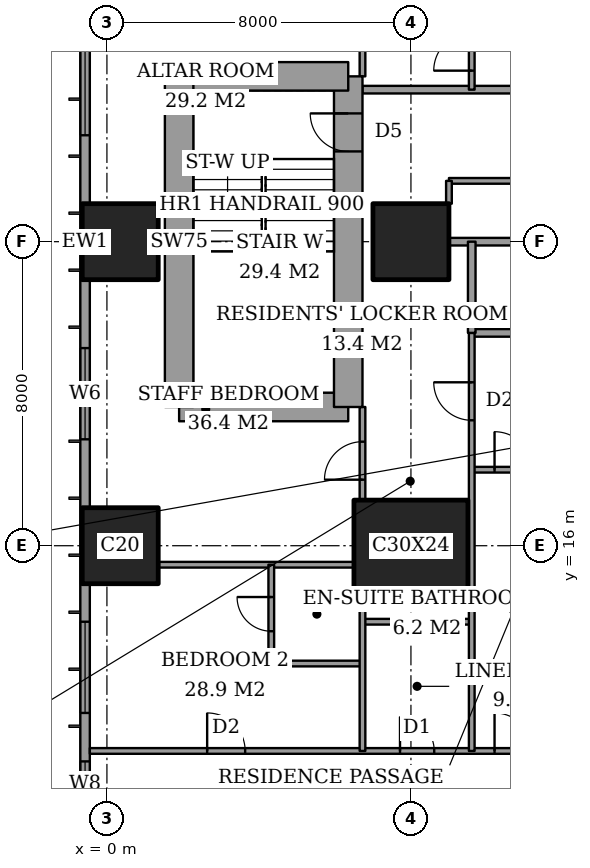
"""IFC4 building model, lengths in metres.
Left out: names, types, materials, properties, quantities, classifications, styles, units other than length and angle.
Written with IfcOpenShell. Run it as: python <this file> out.ifc"""

import sys

from ifc_helpers import new_model, si_unit, direction, frame, frame_2d, origin, origin_2d, place, context, subcontext, project, spatial, rectangle, extrude, element, fill, save


model = new_model("IFC4")
c1 = context("Model", 3, precision=1e-05, world=origin(), true_north=direction((0.0, 1.0)))
c2 = subcontext(c1, "Body", "Model", "MODEL_VIEW")
j1 = project(units=[si_unit("LENGTHUNIT", "METRE"), si_unit("PLANEANGLEUNIT", "RADIAN")], contexts=[c1])
p1 = place(None, origin())
s1 = spatial("IfcSite", under=j1, at=p1, CompositionType="ELEMENT")
p2 = place(p1, origin())
s2 = spatial("IfcBuilding", under=s1, at=p2, CompositionType="ELEMENT")
p3 = place(p2, frame((0.0, 0.0, 58.4)))
s3 = spatial("IfcBuildingStorey", under=s2, at=p3, CompositionType="ELEMENT", Elevation=58.4)
for number, where, z_axis, x_axis in (
    (1, (0.35, 16.0, 0.0), (0.0, 0.0, 1.0), (1.0, 0.0, 0.0)),
    (2, (0.35, 24.0, 0.0), (0.0, 0.0, 1.0), (1.0, 0.0, 0.0)),
):
    element("IfcColumn", number, at=place(p3, frame(where, z_axis=z_axis, x_axis=x_axis)), inside=s3, PredefinedType="COLUMN", context=c2, shape_type="SweptSolid", body=[
        extrude(rectangle(XDim=2.0, YDim=2.0, at=origin_2d()), origin(), (0.0, 0.0, 1.0), 3.6),
    ])
p4 = place(p3, frame((8.0, 16.0, 0.0), z_axis=(0.0, 0.0, 1.0), x_axis=(1.0, 0.0, 0.0)))
e3 = element("IfcColumn", 3, at=p4, inside=s3, PredefinedType="COLUMN", context=c2, shape_type="SweptSolid", body=[
    extrude(rectangle(XDim=3.0, YDim=2.4, at=origin_2d()), origin(), (0.0, 0.0, 1.0), 3.6),
])
p5 = place(p3, frame((8.0, 24.0, 0.0), z_axis=(0.0, 0.0, 1.0), x_axis=(1.0, 0.0, 0.0)))
e4 = element("IfcColumn", 4, at=p5, inside=s3, PredefinedType="COLUMN", context=c2, shape_type="SweptSolid", body=[
    extrude(rectangle(XDim=2.0, YDim=2.0, at=origin_2d()), origin(), (0.0, 0.0, 1.0), 3.6),
])
p6 = place(p3, frame((1.9, 19.65, 0.0), z_axis=(0.0, 0.0, 1.0), x_axis=(1.0, 0.0, 0.0)))
e5 = element("IfcWall", 5, at=p6, inside=s3, PredefinedType="SHEAR", context=c2, shape_type="SweptSolid", body=[
    extrude(rectangle(XDim=4.45, YDim=0.75, at=frame_2d((2.225, 0.0))), origin(), (0.0, 0.0, 1.0), 3.6),
])
p7 = place(p3, frame((6.35, 19.65, 0.0), z_axis=(0.0, 0.0, 1.0), x_axis=(0.0, 1.0, 0.0)))
e6 = element("IfcWall", 6, at=p7, inside=s3, PredefinedType="SHEAR", context=c2, shape_type="SweptSolid", body=[
    extrude(rectangle(XDim=8.7, YDim=0.75, at=frame_2d((4.35, 0.0))), origin(), (0.0, 0.0, 1.0), 3.6),
])
p8 = place(p7, frame((6.725, 0.0, 0.0)))
e7 = element("IfcOpeningElement", 7, at=p8, cuts=e6, PredefinedType="OPENING", context=c2, shape_type="SweptSolid", body=[
    extrude(rectangle(XDim=1.0, YDim=2.1, at=frame_2d((0.5, 1.05))), frame((0.0, 0.385, 0.0), z_axis=(0.0, -1.0, 0.0), x_axis=(1.0, 0.0, 0.0)), (0.0, 0.0, 1.0), 0.77),
])
p9 = place(p3, frame((6.35, 28.35, 0.0), z_axis=(0.0, 0.0, 1.0), x_axis=(-1.0, 0.0, 0.0)))
e8 = element("IfcWall", 8, at=p9, inside=s3, PredefinedType="SHEAR", context=c2, shape_type="SweptSolid", body=[
    extrude(rectangle(XDim=4.45, YDim=0.75, at=frame_2d((2.225, 0.0))), origin(), (0.0, 0.0, 1.0), 3.6),
])
p10 = place(p3, frame((1.9, 28.35, 0.0), z_axis=(0.0, 0.0, 1.0), x_axis=(0.0, -1.0, 0.0)))
e9 = element("IfcWall", 9, at=p10, inside=s3, PredefinedType="SHEAR", context=c2, shape_type="SweptSolid", body=[
    extrude(rectangle(XDim=8.7, YDim=0.75, at=frame_2d((4.35, 0.0))), origin(), (0.0, 0.0, 1.0), 3.6),
])
p11 = place(p3, frame((-0.575, 44.825, 0.0), z_axis=(0.0, 0.0, 1.0), x_axis=(0.0, -1.0, 0.0)))
e10 = element("IfcWall", 10, at=p11, inside=s3, PredefinedType="SOLIDWALL", context=c2, shape_type="SweptSolid", body=[
    extrude(rectangle(XDim=41.65, YDim=0.25, at=frame_2d((20.825, 0.0))), origin(), (0.0, 0.0, 1.0), 3.6),
])
p12 = place(p11, frame((0.775, 0.0, 0.6)))
e11 = element("IfcOpeningElement", 11, at=p12, cuts=e10, PredefinedType="OPENING", context=c2, shape_type="SweptSolid", body=[
    extrude(rectangle(XDim=2.4, YDim=2.0, at=frame_2d((1.2, 1.0))), frame((0.0, 0.135, 0.0), z_axis=(0.0, -1.0, 0.0), x_axis=(1.0, 0.0, 0.0)), (0.0, 0.0, 1.0), 0.27),
])
p13 = place(p11, frame((6.1, 0.0, 0.6)))
e12 = element("IfcOpeningElement", 12, at=p13, cuts=e10, PredefinedType="OPENING", context=c2, shape_type="SweptSolid", body=[
    extrude(rectangle(XDim=1.2, YDim=2.0, at=frame_2d((0.6, 1.0))), frame((0.0, 0.135, 0.0), z_axis=(0.0, -1.0, 0.0), x_axis=(1.0, 0.0, 0.0)), (0.0, 0.0, 1.0), 0.27),
])
p14 = place(p11, frame((8.425, 0.0, 0.6)))
e13 = element("IfcOpeningElement", 13, at=p14, cuts=e10, PredefinedType="OPENING", context=c2, shape_type="SweptSolid", body=[
    extrude(rectangle(XDim=2.4, YDim=2.0, at=frame_2d((1.2, 1.0))), frame((0.0, 0.135, 0.0), z_axis=(0.0, -1.0, 0.0), x_axis=(1.0, 0.0, 0.0)), (0.0, 0.0, 1.0), 0.27),
])
p15 = place(p11, frame((15.625, 0.0, 0.6)))
e14 = element("IfcOpeningElement", 14, at=p15, cuts=e10, PredefinedType="OPENING", context=c2, shape_type="SweptSolid", body=[
    extrude(rectangle(XDim=2.4, YDim=2.0, at=frame_2d((1.2, 1.0))), frame((0.0, 0.135, 0.0), z_axis=(0.0, -1.0, 0.0), x_axis=(1.0, 0.0, 0.0)), (0.0, 0.0, 1.0), 0.27),
])
p16 = place(p11, frame((23.625, 0.0, 0.6)))
e15 = element("IfcOpeningElement", 15, at=p16, cuts=e10, PredefinedType="OPENING", context=c2, shape_type="SweptSolid", body=[
    extrude(rectangle(XDim=2.4, YDim=2.0, at=frame_2d((1.2, 1.0))), frame((0.0, 0.135, 0.0), z_axis=(0.0, -1.0, 0.0), x_axis=(1.0, 0.0, 0.0)), (0.0, 0.0, 1.0), 0.27),
])
p17 = place(p11, frame((30.825, 0.0, 0.6)))
e16 = element("IfcOpeningElement", 16, at=p17, cuts=e10, PredefinedType="OPENING", context=c2, shape_type="SweptSolid", body=[
    extrude(rectangle(XDim=2.4, YDim=2.0, at=frame_2d((1.2, 1.0))), frame((0.0, 0.135, 0.0), z_axis=(0.0, -1.0, 0.0), x_axis=(1.0, 0.0, 0.0)), (0.0, 0.0, 1.0), 0.27),
])
p18 = place(p11, frame((34.5, 0.0, 0.6)))
e17 = element("IfcOpeningElement", 17, at=p18, cuts=e10, PredefinedType="OPENING", context=c2, shape_type="SweptSolid", body=[
    extrude(rectangle(XDim=1.2, YDim=2.0, at=frame_2d((0.6, 1.0))), frame((0.0, 0.135, 0.0), z_axis=(0.0, -1.0, 0.0), x_axis=(1.0, 0.0, 0.0)), (0.0, 0.0, 1.0), 0.27),
])
p19 = place(p11, frame((38.475, 0.0, 0.6)))
e18 = element("IfcOpeningElement", 18, at=p19, cuts=e10, PredefinedType="OPENING", context=c2, shape_type="SweptSolid", body=[
    extrude(rectangle(XDim=2.4, YDim=2.0, at=frame_2d((1.2, 1.0))), frame((0.0, 0.135, 0.0), z_axis=(0.0, -1.0, 0.0), x_axis=(1.0, 0.0, 0.0)), (0.0, 0.0, 1.0), 0.27),
])
p20 = place(p3, frame((-0.45, 10.6, 0.0), z_axis=(0.0, 0.0, 1.0), x_axis=(1.0, 0.0, 0.0)))
e19 = element("IfcWall", 19, at=p20, inside=s3, PredefinedType="PARTITIONING", context=c2, shape_type="SweptSolid", body=[
    extrude(rectangle(XDim=25.011, YDim=0.15, at=frame_2d((12.505, 0.0))), origin(), (0.0, 0.0, 1.0), 3.35),
])
p21 = place(p20, frame((10.65, 0.0, 0.0)))
e20 = element("IfcOpeningElement", 20, at=p21, cuts=e19, PredefinedType="OPENING", context=c2, shape_type="SweptSolid", body=[
    extrude(rectangle(XDim=1.0, YDim=2.1, at=frame_2d((0.5, 1.05))), frame((0.0, 0.085, 0.0), z_axis=(0.0, -1.0, 0.0), x_axis=(1.0, 0.0, 0.0)), (0.0, 0.0, 1.0), 0.17),
])
p22 = place(p20, frame((3.087, 0.0, 0.0)))
e21 = element("IfcOpeningElement", 21, at=p22, cuts=e19, PredefinedType="OPENING", context=c2, shape_type="SweptSolid", body=[
    extrude(rectangle(XDim=1.0, YDim=2.1, at=frame_2d((0.5, 1.05))), frame((0.0, 0.085, 0.0), z_axis=(0.0, -1.0, 0.0), x_axis=(1.0, 0.0, 0.0)), (0.0, 0.0, 1.0), 0.17),
])
p23 = place(p20, frame((8.163, 0.0, 0.0)))
e22 = element("IfcOpeningElement", 22, at=p23, cuts=e19, PredefinedType="OPENING", context=c2, shape_type="SweptSolid", body=[
    extrude(rectangle(XDim=0.9, YDim=2.1, at=frame_2d((0.45, 1.05))), frame((0.0, 0.085, 0.0), z_axis=(0.0, -1.0, 0.0), x_axis=(1.0, 0.0, 0.0)), (0.0, 0.0, 1.0), 0.17),
])
p24 = place(p20, frame((13.35, 0.0, 0.0)))
e23 = element("IfcOpeningElement", 23, at=p24, cuts=e19, PredefinedType="OPENING", context=c2, shape_type="SweptSolid", body=[
    extrude(rectangle(XDim=1.0, YDim=2.1, at=frame_2d((0.5, 1.05))), frame((0.0, 0.085, 0.0), z_axis=(0.0, -1.0, 0.0), x_axis=(1.0, 0.0, 0.0)), (0.0, 0.0, 1.0), 0.17),
])
p25 = place(p20, frame((16.45, 0.0, 0.0)))
e24 = element("IfcOpeningElement", 24, at=p25, cuts=e19, PredefinedType="OPENING", context=c2, shape_type="SweptSolid", body=[
    extrude(rectangle(XDim=1.0, YDim=2.1, at=frame_2d((0.5, 1.05))), frame((0.0, 0.085, 0.0), z_axis=(0.0, -1.0, 0.0), x_axis=(1.0, 0.0, 0.0)), (0.0, 0.0, 1.0), 0.17),
])
p26 = place(p20, frame((21.175, 0.0, 0.0)))
e25 = element("IfcOpeningElement", 25, at=p26, cuts=e19, PredefinedType="OPENING", context=c2, shape_type="SweptSolid", body=[
    extrude(rectangle(XDim=1.0, YDim=2.1, at=frame_2d((0.5, 1.05))), frame((0.0, 0.085, 0.0), z_axis=(0.0, -1.0, 0.0), x_axis=(1.0, 0.0, 0.0)), (0.0, 0.0, 1.0), 0.17),
])
p27 = place(p3, frame((4.325, 12.9, 0.0), z_axis=(0.0, 0.0, 1.0), x_axis=(1.0, 0.0, 0.0)))
e26 = element("IfcWall", 26, at=p27, inside=s3, PredefinedType="PARTITIONING", context=c2, shape_type="SweptSolid", body=[
    extrude(rectangle(XDim=2.4, YDim=0.15, at=frame_2d((1.2, 0.0))), origin(), (0.0, 0.0, 1.0), 3.35),
])
p28 = place(p3, frame((6.725, 14.0, 0.0), z_axis=(0.0, 0.0, 1.0), x_axis=(1.0, 0.0, 0.0)))
e27 = element("IfcWall", 27, at=p28, inside=s3, PredefinedType="PARTITIONING", context=c2, shape_type="SweptSolid", body=[
    extrude(rectangle(XDim=2.875, YDim=0.15, at=frame_2d((1.438, 0.0))), origin(), (0.0, 0.0, 1.0), 3.35),
])
p29 = place(p3, frame((1.35, 15.5, 0.0), z_axis=(0.0, 0.0, 1.0), x_axis=(1.0, 0.0, 0.0)))
e28 = element("IfcWall", 28, at=p29, inside=s3, PredefinedType="PARTITIONING", context=c2, shape_type="SweptSolid", body=[
    extrude(rectangle(XDim=5.15, YDim=0.15, at=frame_2d((2.575, 0.0))), origin(), (0.0, 0.0, 1.0), 3.35),
])
p30 = place(p3, frame((9.6, 18.0, 0.0), z_axis=(0.0, 0.0, 1.0), x_axis=(1.0, 0.0, 0.0)))
e29 = element("IfcWall", 29, at=p30, inside=s3, PredefinedType="PARTITIONING", context=c2, shape_type="SweptSolid", body=[
    extrude(rectangle(XDim=4.8, YDim=0.15, at=frame_2d((2.4, 0.0))), origin(), (0.0, 0.0, 1.0), 3.35),
])
p31 = place(p30, frame((0.6, 0.0, 0.0)))
e30 = element("IfcOpeningElement", 30, at=p31, cuts=e29, PredefinedType="OPENING", context=c2, shape_type="SweptSolid", body=[
    extrude(rectangle(XDim=1.0, YDim=2.1, at=frame_2d((0.5, 1.05))), frame((0.0, 0.085, 0.0), z_axis=(0.0, -1.0, 0.0), x_axis=(1.0, 0.0, 0.0)), (0.0, 0.0, 1.0), 0.17),
])
p32 = place(p3, frame((9.6, 21.6, 0.0), z_axis=(0.0, 0.0, 1.0), x_axis=(1.0, 0.0, 0.0)))
e31 = element("IfcWall", 31, at=p32, inside=s3, PredefinedType="PARTITIONING", context=c2, shape_type="SweptSolid", body=[
    extrude(rectangle(XDim=5.2, YDim=0.2, at=frame_2d((2.6, 0.0))), origin(), (0.0, 0.0, 1.0), 3.35),
])
p33 = place(p32, frame((2.15, 0.0, 0.0)))
e32 = element("IfcOpeningElement", 32, at=p33, cuts=e31, PredefinedType="OPENING", context=c2, shape_type="SweptSolid", body=[
    extrude(rectangle(XDim=0.9, YDim=2.1, at=frame_2d((0.45, 1.05))), frame((0.0, 0.11, 0.0), z_axis=(0.0, -1.0, 0.0), x_axis=(1.0, 0.0, 0.0)), (0.0, 0.0, 1.0), 0.22),
])
p34 = place(p3, frame((9.0, 24.0, 0.0), z_axis=(0.0, 0.0, 1.0), x_axis=(1.0, 0.0, 0.0)))
e33 = element("IfcWall", 33, at=p34, inside=s3, PredefinedType="PARTITIONING", context=c2, shape_type="SweptSolid", body=[
    extrude(rectangle(XDim=6.0, YDim=0.2, at=frame_2d((3.0, 0.0))), origin(), (0.0, 0.0, 1.0), 3.35),
])
p35 = place(p3, frame((9.0, 25.6, 0.0), z_axis=(0.0, 0.0, 1.0), x_axis=(1.0, 0.0, 0.0)))
e34 = element("IfcWall", 34, at=p35, inside=s3, PredefinedType="PARTITIONING", context=c2, shape_type="SweptSolid", body=[
    extrude(rectangle(XDim=8.4, YDim=0.15, at=frame_2d((4.2, 0.0))), origin(), (0.0, 0.0, 1.0), 3.35),
])
p36 = place(p35, frame((3.75, 0.0, 0.0)))
e35 = element("IfcOpeningElement", 35, at=p36, cuts=e34, PredefinedType="OPENING", context=c2, shape_type="SweptSolid", body=[
    extrude(rectangle(XDim=0.9, YDim=2.1, at=frame_2d((0.45, 1.05))), frame((0.0, 0.085, 0.0), z_axis=(0.0, -1.0, 0.0), x_axis=(1.0, 0.0, 0.0)), (0.0, 0.0, 1.0), 0.17),
])
p37 = place(p3, frame((6.725, 28.0, 0.0), z_axis=(0.0, 0.0, 1.0), x_axis=(1.0, 0.0, 0.0)))
e36 = element("IfcWall", 36, at=p37, inside=s3, PredefinedType="PARTITIONING", context=c2, shape_type="SweptSolid", body=[
    extrude(rectangle(XDim=17.275, YDim=0.2, at=frame_2d((8.637, 0.0))), origin(), (0.0, 0.0, 1.0), 3.35),
])
p38 = place(p37, frame((6.475, 0.0, 0.0)))
e37 = element("IfcOpeningElement", 37, at=p38, cuts=e36, PredefinedType="OPENING", context=c2, shape_type="SweptSolid", body=[
    extrude(rectangle(XDim=1.2, YDim=2.4, at=frame_2d((0.6, 1.2))), frame((0.0, 0.11, 0.0), z_axis=(0.0, -1.0, 0.0), x_axis=(1.0, 0.0, 0.0)), (0.0, 0.0, 1.0), 0.22),
])
p39 = place(p3, frame((4.325, 12.9, 0.0), z_axis=(0.0, 0.0, 1.0), x_axis=(0.0, 1.0, 0.0)))
e38 = element("IfcWall", 38, at=p39, inside=s3, PredefinedType="PARTITIONING", context=c2, shape_type="SweptSolid", body=[
    extrude(rectangle(XDim=2.6, YDim=0.15, at=frame_2d((1.3, 0.0))), origin(), (0.0, 0.0, 1.0), 3.35),
])
p40 = place(p39, frame((0.85, 0.0, 0.0)))
e39 = element("IfcOpeningElement", 39, at=p40, cuts=e38, PredefinedType="OPENING", context=c2, shape_type="SweptSolid", body=[
    extrude(rectangle(XDim=0.9, YDim=2.1, at=frame_2d((0.45, 1.05))), frame((0.0, 0.085, 0.0), z_axis=(0.0, -1.0, 0.0), x_axis=(1.0, 0.0, 0.0)), (0.0, 0.0, 1.0), 0.17),
])
p41 = place(p3, frame((6.725, 10.6, 0.0), z_axis=(0.0, 0.0, 1.0), x_axis=(0.0, 1.0, 0.0)))
e40 = element("IfcWall", 40, at=p41, inside=s3, PredefinedType="PARTITIONING", context=c2, shape_type="SweptSolid", body=[
    extrude(rectangle(XDim=4.2, YDim=0.15, at=frame_2d((2.1, 0.0))), origin(), (0.0, 0.0, 1.0), 3.35),
])
p42 = place(p3, frame((6.725, 17.2, 0.0), z_axis=(0.0, 0.0, 1.0), x_axis=(0.0, 1.0, 0.0)))
e41 = element("IfcWall", 41, at=p42, inside=s3, PredefinedType="PARTITIONING", context=c2, shape_type="SweptSolid", body=[
    extrude(rectangle(XDim=2.45, YDim=0.15, at=frame_2d((1.225, 0.0))), origin(), (0.0, 0.0, 1.0), 3.35),
])
p43 = place(p42, frame((0.538, 0.0, 0.0)))
e42 = element("IfcOpeningElement", 42, at=p43, cuts=e41, PredefinedType="OPENING", context=c2, shape_type="SweptSolid", body=[
    extrude(rectangle(XDim=1.0, YDim=2.1, at=frame_2d((0.5, 1.05))), frame((0.0, 0.085, 0.0), z_axis=(0.0, -1.0, 0.0), x_axis=(1.0, 0.0, 0.0)), (0.0, 0.0, 1.0), 0.17),
])
p44 = place(p3, frame((6.725, 28.35, 0.0), z_axis=(0.0, 0.0, 1.0), x_axis=(0.0, 1.0, 0.0)))
e43 = element("IfcWall", 43, at=p44, inside=s3, PredefinedType="PARTITIONING", context=c2, shape_type="SweptSolid", body=[
    extrude(rectangle(XDim=2.45, YDim=0.15, at=frame_2d((1.225, 0.0))), origin(), (0.0, 0.0, 1.0), 3.35),
])
p45 = place(p44, frame((0.913, 0.0, 0.0)))
e44 = element("IfcOpeningElement", 44, at=p45, cuts=e43, PredefinedType="OPENING", context=c2, shape_type="SweptSolid", body=[
    extrude(rectangle(XDim=1.0, YDim=2.1, at=frame_2d((0.5, 1.05))), frame((0.0, 0.085, 0.0), z_axis=(0.0, -1.0, 0.0), x_axis=(1.0, 0.0, 0.0)), (0.0, 0.0, 1.0), 0.17),
])
p46 = place(p3, frame((9.0, 25.0, 0.0), z_axis=(0.0, 0.0, 1.0), x_axis=(0.0, 1.0, 0.0)))
e45 = element("IfcWall", 45, at=p46, inside=s3, PredefinedType="PARTITIONING", context=c2, shape_type="SweptSolid", body=[
    extrude(rectangle(XDim=0.6, YDim=0.15, at=frame_2d((0.3, 0.0))), origin(), (0.0, 0.0, 1.0), 3.35),
])
p47 = place(p3, frame((9.6, 21.6, 0.0), z_axis=(0.0, 0.0, 1.0), x_axis=(0.0, 1.0, 0.0)))
e46 = element("IfcWall", 46, at=p47, inside=s3, PredefinedType="PARTITIONING", context=c2, shape_type="SweptSolid", body=[
    extrude(rectangle(XDim=2.4, YDim=0.2, at=frame_2d((1.2, 0.0))), origin(), (0.0, 0.0, 1.0), 3.35),
])
p48 = place(p3, frame((9.6, 10.6, 0.0), z_axis=(0.0, 0.0, 1.0), x_axis=(0.0, 1.0, 0.0)))
e47 = element("IfcWall", 47, at=p48, inside=s3, PredefinedType="PARTITIONING", context=c2, shape_type="SweptSolid", body=[
    extrude(rectangle(XDim=11.0, YDim=0.15, at=frame_2d((5.5, 0.0))), origin(), (0.0, 0.0, 1.0), 3.35),
])
p49 = place(p48, frame((8.7, 0.0, 0.0)))
e48 = element("IfcOpeningElement", 48, at=p49, cuts=e47, PredefinedType="OPENING", context=c2, shape_type="SweptSolid", body=[
    extrude(rectangle(XDim=1.0, YDim=2.1, at=frame_2d((0.5, 1.05))), frame((0.0, 0.085, 0.0), z_axis=(0.0, -1.0, 0.0), x_axis=(1.0, 0.0, 0.0)), (0.0, 0.0, 1.0), 0.17),
])
p50 = place(p3, frame((9.6, 28.0, 0.0), z_axis=(0.0, 0.0, 1.0), x_axis=(0.0, 1.0, 0.0)))
e49 = element("IfcWall", 49, at=p50, inside=s3, PredefinedType="PARTITIONING", context=c2, shape_type="SweptSolid", body=[
    extrude(rectangle(XDim=9.4, YDim=0.15, at=frame_2d((4.7, 0.0))), origin(), (0.0, 0.0, 1.0), 3.35),
])
p51 = place(p50, frame((0.5, 0.0, 0.0)))
e50 = element("IfcOpeningElement", 50, at=p51, cuts=e49, PredefinedType="OPENING", context=c2, shape_type="SweptSolid", body=[
    extrude(rectangle(XDim=1.0, YDim=2.1, at=frame_2d((0.5, 1.05))), frame((0.0, 0.085, 0.0), z_axis=(0.0, -1.0, 0.0), x_axis=(1.0, 0.0, 0.0)), (0.0, 0.0, 1.0), 0.17),
])
p52 = place(p15, origin())
e51 = element("IfcWindow", 51, at=p52, inside=s3, PartitioningType="SINGLE_PANEL", PredefinedType="WINDOW", context=c2, shape_type="SweptSolid", body=[
    extrude(rectangle(XDim=2.4, YDim=2.0, at=frame_2d((1.2, 1.0))), frame((0.0, 0.03, 0.0), z_axis=(0.0, -1.0, 0.0), x_axis=(1.0, 0.0, 0.0)), (0.0, 0.0, 1.0), 0.06),
])
fill(e14, e51)
p53 = place(p16, origin())
e52 = element("IfcWindow", 52, at=p53, inside=s3, PartitioningType="SINGLE_PANEL", PredefinedType="WINDOW", context=c2, shape_type="SweptSolid", body=[
    extrude(rectangle(XDim=2.4, YDim=2.0, at=frame_2d((1.2, 1.0))), frame((0.0, 0.03, 0.0), z_axis=(0.0, -1.0, 0.0), x_axis=(1.0, 0.0, 0.0)), (0.0, 0.0, 1.0), 0.06),
])
fill(e15, e52)
p54 = place(p17, origin())
e53 = element("IfcWindow", 53, at=p54, inside=s3, PartitioningType="SINGLE_PANEL", PredefinedType="WINDOW", context=c2, shape_type="SweptSolid", body=[
    extrude(rectangle(XDim=2.4, YDim=2.0, at=frame_2d((1.2, 1.0))), frame((0.0, 0.03, 0.0), z_axis=(0.0, -1.0, 0.0), x_axis=(1.0, 0.0, 0.0)), (0.0, 0.0, 1.0), 0.06),
])
fill(e16, e53)
p55 = place(p18, origin())
e54 = element("IfcWindow", 54, at=p55, inside=s3, PartitioningType="SINGLE_PANEL", PredefinedType="WINDOW", context=c2, shape_type="SweptSolid", body=[
    extrude(rectangle(XDim=1.2, YDim=2.0, at=frame_2d((0.6, 1.0))), frame((0.0, 0.03, 0.0), z_axis=(0.0, -1.0, 0.0), x_axis=(1.0, 0.0, 0.0)), (0.0, 0.0, 1.0), 0.06),
])
fill(e17, e54)
p56 = place(p21, origin())
e55 = element("IfcDoor", 55, at=p56, inside=s3, OperationType="SINGLE_SWING_RIGHT", PredefinedType="DOOR", context=c2, shape_type="SweptSolid", body=[
    extrude(rectangle(XDim=1.0, YDim=2.1, at=frame_2d((0.5, 1.05))), frame((0.0, 0.025, 0.0), z_axis=(0.0, -1.0, 0.0), x_axis=(1.0, 0.0, 0.0)), (0.0, 0.0, 1.0), 0.05),
])
fill(e20, e55)
p57 = place(p40, origin())
e56 = element("IfcDoor", 56, at=p57, inside=s3, OperationType="SINGLE_SWING_LEFT", PredefinedType="DOOR", context=c2, shape_type="SweptSolid", body=[
    extrude(rectangle(XDim=0.9, YDim=2.1, at=frame_2d((0.45, 1.05))), frame((0.0, 0.025, 0.0), z_axis=(0.0, -1.0, 0.0), x_axis=(1.0, 0.0, 0.0)), (0.0, 0.0, 1.0), 0.05),
])
fill(e39, e56)
p58 = place(p22, origin())
e57 = element("IfcDoor", 57, at=p58, inside=s3, OperationType="SINGLE_SWING_RIGHT", PredefinedType="DOOR", context=c2, shape_type="SweptSolid", body=[
    extrude(rectangle(XDim=1.0, YDim=2.1, at=frame_2d((0.5, 1.05))), frame((0.0, 0.025, 0.0), z_axis=(0.0, -1.0, 0.0), x_axis=(1.0, 0.0, 0.0)), (0.0, 0.0, 1.0), 0.05),
])
fill(e21, e57)
p59 = place(p43, origin())
e58 = element("IfcDoor", 58, at=p59, inside=s3, OperationType="SINGLE_SWING_RIGHT", PredefinedType="DOOR", context=c2, shape_type="SweptSolid", body=[
    extrude(rectangle(XDim=1.0, YDim=2.1, at=frame_2d((0.5, 1.05))), frame((0.0, 0.025, 0.0), z_axis=(0.0, -1.0, 0.0), x_axis=(1.0, 0.0, 0.0)), (0.0, 0.0, 1.0), 0.05),
])
fill(e42, e58)
p60 = place(p23, origin())
e59 = element("IfcDoor", 59, at=p60, inside=s3, OperationType="SINGLE_SWING_RIGHT", PredefinedType="DOOR", context=c2, shape_type="SweptSolid", body=[
    extrude(rectangle(XDim=0.9, YDim=2.1, at=frame_2d((0.45, 1.05))), frame((0.0, 0.025, 0.0), z_axis=(0.0, -1.0, 0.0), x_axis=(1.0, 0.0, 0.0)), (0.0, 0.0, 1.0), 0.05),
])
fill(e22, e59)
p61 = place(p49, origin())
e60 = element("IfcDoor", 60, at=p61, inside=s3, OperationType="SINGLE_SWING_LEFT", PredefinedType="DOOR", context=c2, shape_type="SweptSolid", body=[
    extrude(rectangle(XDim=1.0, YDim=2.1, at=frame_2d((0.5, 1.05))), frame((0.0, 0.025, 0.0), z_axis=(0.0, -1.0, 0.0), x_axis=(1.0, 0.0, 0.0)), (0.0, 0.0, 1.0), 0.05),
])
fill(e48, e60)
p62 = place(p31, origin())
e61 = element("IfcDoor", 61, at=p62, inside=s3, OperationType="SINGLE_SWING_RIGHT", PredefinedType="DOOR", context=c2, shape_type="SweptSolid", body=[
    extrude(rectangle(XDim=1.0, YDim=2.1, at=frame_2d((0.5, 1.05))), frame((0.0, 0.025, 0.0), z_axis=(0.0, -1.0, 0.0), x_axis=(1.0, 0.0, 0.0)), (0.0, 0.0, 1.0), 0.05),
])
fill(e30, e61)
p63 = place(p51, origin())
e62 = element("IfcDoor", 62, at=p63, inside=s3, OperationType="SINGLE_SWING_RIGHT", PredefinedType="DOOR", context=c2, shape_type="SweptSolid", body=[
    extrude(rectangle(XDim=1.0, YDim=2.1, at=frame_2d((0.5, 1.05))), frame((0.0, 0.025, 0.0), z_axis=(0.0, -1.0, 0.0), x_axis=(1.0, 0.0, 0.0)), (0.0, 0.0, 1.0), 0.05),
])
fill(e50, e62)
p64 = place(p8, origin())
e63 = element("IfcDoor", 63, at=p64, inside=s3, OperationType="SINGLE_SWING_LEFT", PredefinedType="DOOR", context=c2, shape_type="SweptSolid", body=[
    extrude(rectangle(XDim=1.0, YDim=2.1, at=frame_2d((0.5, 1.05))), frame((0.0, 0.025, 0.0), z_axis=(0.0, -1.0, 0.0), x_axis=(1.0, 0.0, 0.0)), (0.0, 0.0, 1.0), 0.05),
])
fill(e7, e63)
save(model, sys.argv[1])
